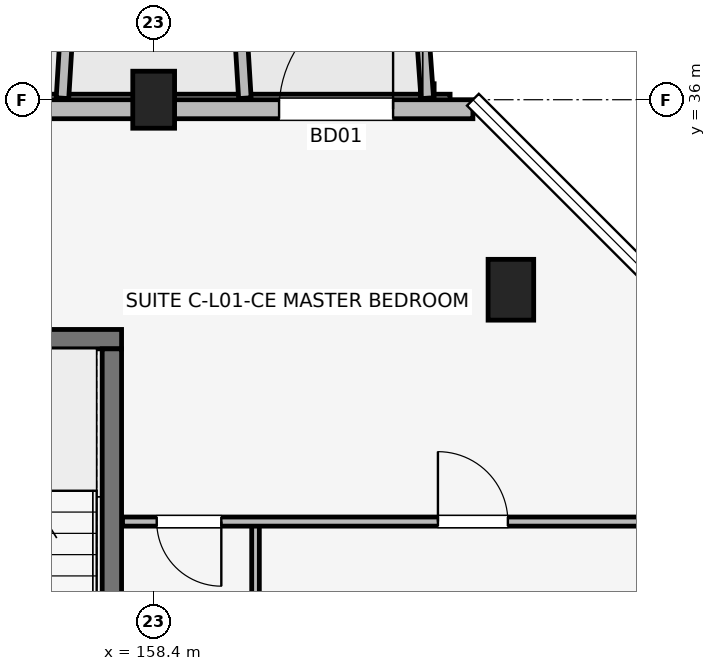
"""IFC4 building model, lengths in metres.
Left out: names, types, materials, properties, quantities, classifications, styles, units other than length and angle.
Written with IfcOpenShell. Run it as: python <this file> out.ifc"""

import sys

from ifc_helpers import new_model, si_unit, direction, frame, frame_2d, origin, origin_2d, place, context, subcontext, project, spatial, rectangle, extrude, element, fill, save


model = new_model("IFC4")
c1 = context("Model", 3, precision=1e-05, world=origin(), true_north=direction((0.0, 1.0)))
c2 = subcontext(c1, "Body", "Model", "MODEL_VIEW")
j1 = project(units=[si_unit("LENGTHUNIT", "METRE"), si_unit("PLANEANGLEUNIT", "RADIAN")], contexts=[c1])
p1 = place(None, origin())
s1 = spatial("IfcSite", under=j1, at=p1, CompositionType="ELEMENT")
p2 = place(p1, origin())
s2 = spatial("IfcBuilding", under=s1, at=p2, CompositionType="ELEMENT")
p3 = place(p2, frame((0.0, 0.0, 4.5)))
s3 = spatial("IfcBuildingStorey", under=s2, at=p3, CompositionType="ELEMENT", Elevation=4.5)
p4 = place(p3, frame((158.4, 36.0, 0.0), z_axis=(0.0, 0.0, 1.0), x_axis=(1.0, 0.0, 0.0)))
e1 = element("IfcColumn", 1, at=p4, inside=s3, PredefinedType="COLUMN", context=c2, shape_type="SweptSolid", body=[
    extrude(rectangle(XDim=0.55, YDim=0.75, at=origin_2d()), origin(), (0.0, 0.0, 1.0), 4.2),
])
p5 = place(p3, frame((163.1, 33.5, 0.0), z_axis=(0.0, 0.0, 1.0), x_axis=(1.0, 0.0, 0.0)))
e2 = element("IfcColumn", 2, at=p5, inside=s3, PredefinedType="COLUMN", context=c2, shape_type="SweptSolid", body=[
    extrude(rectangle(XDim=0.6, YDim=0.8, at=origin_2d()), origin(), (0.0, 0.0, 1.0), 4.2),
])
p6 = place(p3, frame((154.673, 32.85, 0.0), z_axis=(0.0, 0.0, 1.0), x_axis=(1.0, 0.0, 0.0)))
e3 = element("IfcWall", 3, at=p6, inside=s3, PredefinedType="SHEAR", context=c2, shape_type="SweptSolid", body=[
    extrude(rectangle(XDim=3.305, YDim=0.255, at=frame_2d((1.652, 0.0))), origin(), (0.0, 0.0, 1.0), 4.2),
])
p7 = place(p3, frame((157.85, 26.427, 0.0), z_axis=(0.0, 0.0, 1.0), x_axis=(0.0, 1.0, 0.0)))
e4 = element("IfcWall", 4, at=p7, inside=s3, PredefinedType="SHEAR", context=c2, shape_type="SweptSolid", body=[
    extrude(rectangle(XDim=6.295, YDim=0.255, at=frame_2d((3.147, 0.0))), origin(), (0.0, 0.0, 1.0), 4.2),
])
p8 = place(p3, frame((162.6, 35.875, 0.0), z_axis=(0.0, 0.0, 1.0), x_axis=(-1.0, 0.0, 0.0)))
e5 = element("IfcWall", 5, at=p8, inside=s3, PredefinedType="SOLIDWALL", context=c2, shape_type="SweptSolid", body=[
    extrude(rectangle(XDim=30.0, YDim=0.25, at=frame_2d((15.0, 0.0))), origin(), (0.0, 0.0, 1.0), 3.48),
])
p9 = place(p8, frame((29.1, 0.0, 0.0), z_axis=(0.0, 0.0, 1.0), x_axis=(-1.0, 0.0, 0.0)))
e6 = element("IfcOpeningElement", 6, at=p9, cuts=e5, PredefinedType="OPENING", context=c2, shape_type="SweptSolid", body=[
    extrude(rectangle(XDim=1.8, YDim=2.15, at=frame_2d((0.9, 1.075))), frame((0.0, 0.135, 0.0), z_axis=(0.0, -1.0, 0.0), x_axis=(1.0, 0.0, 0.0)), (0.0, 0.0, 1.0), 0.27),
])
p10 = place(p8, frame((2.55, 0.0, 0.0), z_axis=(0.0, 0.0, 1.0), x_axis=(-1.0, 0.0, 0.0)))
e7 = element("IfcOpeningElement", 7, at=p10, cuts=e5, PredefinedType="OPENING", context=c2, shape_type="SweptSolid", body=[
    extrude(rectangle(XDim=1.5, YDim=2.15, at=frame_2d((0.75, 1.075))), frame((0.0, 0.135, 0.0), z_axis=(0.0, -1.0, 0.0), x_axis=(1.0, 0.0, 0.0)), (0.0, 0.0, 1.0), 0.27),
])
p11 = place(p8, frame((15.355, 0.0, 0.5)))
e8 = element("IfcOpeningElement", 8, at=p11, cuts=e5, PredefinedType="OPENING", context=c2, shape_type="SweptSolid", body=[
    extrude(rectangle(XDim=0.9, YDim=1.8, at=frame_2d((0.45, 0.9))), frame((0.0, 0.135, 0.0), z_axis=(0.0, -1.0, 0.0), x_axis=(1.0, 0.0, 0.0)), (0.0, 0.0, 1.0), 0.27),
])
p12 = place(p8, frame((8.075, 0.0, 0.7)))
e9 = element("IfcOpeningElement", 9, at=p12, cuts=e5, PredefinedType="OPENING", context=c2, shape_type="SweptSolid", body=[
    extrude(rectangle(XDim=2.0, YDim=1.65, at=frame_2d((1.0, 0.825))), frame((0.0, 0.135, 0.0), z_axis=(0.0, -1.0, 0.0), x_axis=(1.0, 0.0, 0.0)), (0.0, 0.0, 1.0), 0.27),
])
p13 = place(p8, frame((19.97, 0.0, 0.7)))
e10 = element("IfcOpeningElement", 10, at=p13, cuts=e5, PredefinedType="OPENING", context=c2, shape_type="SweptSolid", body=[
    extrude(rectangle(XDim=1.86, YDim=1.6, at=frame_2d((0.93, 0.8))), frame((0.0, 0.135, 0.0), z_axis=(0.0, -1.0, 0.0), x_axis=(1.0, 0.0, 0.0)), (0.0, 0.0, 1.0), 0.27),
])
p14 = place(p3, frame((157.2, 36.02, 0.0), z_axis=(0.0, 0.0, 1.0), x_axis=(0.061170732449, 0.998127317276, 0.0)))
e11 = element("IfcWall", 11, at=p14, inside=s3, PredefinedType="ELEMENTEDWALL", context=c2, shape_type="SweptSolid", body=[
    extrude(rectangle(XDim=1.964, YDim=0.165, at=frame_2d((0.982, 0.0))), origin(), (0.0, 0.0, 1.0), 3.58),
])
p15 = place(p3, frame((159.6, 36.02, 0.0), z_axis=(0.0, 0.0, 1.0), x_axis=(-0.061170732449, 0.998127317276, 0.0)))
e12 = element("IfcWall", 12, at=p15, inside=s3, PredefinedType="ELEMENTEDWALL", context=c2, shape_type="SweptSolid", body=[
    extrude(rectangle(XDim=1.964, YDim=0.165, at=frame_2d((0.982, 0.0))), origin(), (0.0, 0.0, 1.0), 4.0),
])
p16 = place(p3, frame((162.0, 36.02, 0.0), z_axis=(0.0, 0.0, 1.0), x_axis=(-0.071194071069, 0.997462482625, 0.0)))
e13 = element("IfcWall", 13, at=p16, inside=s3, PredefinedType="ELEMENTEDWALL", context=c2, shape_type="SweptSolid", body=[
    extrude(rectangle(XDim=1.965, YDim=0.165, at=frame_2d((0.982, 0.0))), origin(), (0.0, 0.0, 1.0), 4.0),
])
p17 = place(p3, frame((159.74, 26.1, 0.0), z_axis=(0.0, 0.0, 1.0), x_axis=(0.0, 1.0, 0.0)))
e14 = element("IfcWall", 14, at=p17, inside=s3, PredefinedType="PARTITIONING", context=c2, shape_type="SweptSolid", body=[
    extrude(rectangle(XDim=4.35, YDim=0.1, at=frame_2d((2.175, 0.0))), origin(), (0.0, 0.0, 1.0), 3.25),
])
p18 = place(p3, frame((157.99, 30.45, 0.0), z_axis=(0.0, 0.0, 1.0), x_axis=(1.0, 0.0, 0.0)))
e15 = element("IfcWall", 15, at=p18, inside=s3, PredefinedType="PARTITIONING", context=c2, shape_type="SweptSolid", body=[
    extrude(rectangle(XDim=7.47, YDim=0.12, at=frame_2d((3.735, 0.0))), origin(), (0.0, 0.0, 1.0), 3.25),
])
p19 = place(p18, frame((1.3, 0.0, 0.0), z_axis=(0.0, 0.0, 1.0), x_axis=(-1.0, 0.0, 0.0)))
e16 = element("IfcOpeningElement", 16, at=p19, cuts=e15, PredefinedType="OPENING", context=c2, shape_type="SweptSolid", body=[
    extrude(rectangle(XDim=0.85, YDim=2.08, at=frame_2d((0.425, 1.04))), frame((0.0, 0.07, 0.0), z_axis=(0.0, -1.0, 0.0), x_axis=(1.0, 0.0, 0.0)), (0.0, 0.0, 1.0), 0.14),
])
p20 = place(p18, frame((4.15, 0.0, 0.0)))
e17 = element("IfcOpeningElement", 17, at=p20, cuts=e15, PredefinedType="OPENING", context=c2, shape_type="SweptSolid", body=[
    extrude(rectangle(XDim=0.92, YDim=2.08, at=frame_2d((0.46, 1.04))), frame((0.0, 0.07, 0.0), z_axis=(0.0, -1.0, 0.0), x_axis=(1.0, 0.0, 0.0)), (0.0, 0.0, 1.0), 0.14),
])
p21 = place(p10, origin())
e18 = element("IfcDoor", 18, at=p21, inside=s3, OperationType="SINGLE_SWING_LEFT", PredefinedType="DOOR", context=c2, shape_type="SweptSolid", body=[
    extrude(rectangle(XDim=1.5, YDim=2.15, at=frame_2d((0.75, 1.075))), frame((0.0, 0.025, 0.0), z_axis=(0.0, -1.0, 0.0), x_axis=(1.0, 0.0, 0.0)), (0.0, 0.0, 1.0), 0.05),
])
fill(e7, e18)
p22 = place(p19, origin())
e19 = element("IfcDoor", 19, at=p22, inside=s3, OperationType="SINGLE_SWING_RIGHT", PredefinedType="DOOR", context=c2, shape_type="SweptSolid", body=[
    extrude(rectangle(XDim=0.85, YDim=2.08, at=frame_2d((0.425, 1.04))), frame((0.0, 0.025, 0.0), z_axis=(0.0, -1.0, 0.0), x_axis=(1.0, 0.0, 0.0)), (0.0, 0.0, 1.0), 0.05),
])
fill(e16, e19)
p23 = place(p20, origin())
e20 = element("IfcDoor", 20, at=p23, inside=s3, OperationType="SINGLE_SWING_LEFT", PredefinedType="DOOR", context=c2, shape_type="SweptSolid", body=[
    extrude(rectangle(XDim=0.92, YDim=2.08, at=frame_2d((0.46, 1.04))), frame((0.0, 0.025, 0.0), z_axis=(0.0, -1.0, 0.0), x_axis=(1.0, 0.0, 0.0)), (0.0, 0.0, 1.0), 0.05),
])
fill(e17, e20)
save(model, sys.argv[1])
